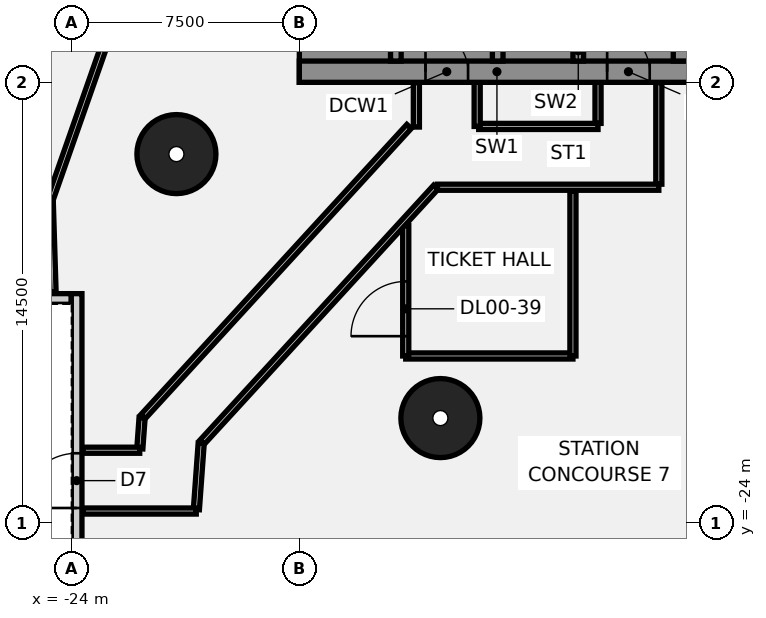
"""IFC4 building model, lengths in metres.
Left out: names, types, materials, properties, quantities, classifications, styles, units other than length and angle.
Written with IfcOpenShell. Run it as: python <this file> out.ifc"""

import sys

from ifc_helpers import new_model, si_unit, direction, frame, frame_2d, origin, origin_2d, place, context, subcontext, project, spatial, polyline, rectangle, circle, outline, extrude, element, fill, save


model = new_model("IFC4")
c1 = context("Model", 3, precision=1e-05, world=origin(), true_north=direction((0.0, 1.0)))
c2 = subcontext(c1, "Body", "Model", "MODEL_VIEW")
j1 = project(units=[si_unit("LENGTHUNIT", "METRE"), si_unit("PLANEANGLEUNIT", "RADIAN")], contexts=[c1])
p1 = place(None, origin())
s1 = spatial("IfcSite", under=j1, at=p1, CompositionType="ELEMENT")
p2 = place(p1, origin())
s2 = spatial("IfcBuilding", under=s1, at=p2, CompositionType="ELEMENT")
p3 = place(p2, origin())
s3 = spatial("IfcBuildingStorey", under=s2, at=p3, CompositionType="ELEMENT", Elevation=0.0)
for number, where, z_axis, x_axis in (
    (1, (-20.543, -11.86, -0.55), (0.0, 0.0, 1.0), (1.0, 0.0, 0.0)),
    (2, (-11.86, -20.543, -0.55), (0.0, 0.0, 1.0), (1.0, 0.0, 0.0)),
):
    element("IfcColumn", number, at=place(p3, frame(where, z_axis=z_axis, x_axis=x_axis)), inside=s3, PredefinedType="COLUMN", context=c2, shape_type="SweptSolid", body=[
        extrude(circle(Radius=1.3, at=origin_2d()), origin(), (0.0, 0.0, 1.0), 9.05),
    ])
p4 = place(p3, frame((-13.0, -18.5, 0.0), z_axis=(0.0, 0.0, 1.0), x_axis=(1.0, 0.0, 0.0)))
e3 = element("IfcWall", 3, at=p4, inside=s3, PredefinedType="PARTITIONING", context=c2, shape_type="SweptSolid", body=[
    extrude(rectangle(XDim=5.5, YDim=0.2, at=frame_2d((2.75, 0.0))), origin(), (0.0, 0.0, 1.0), 8.5),
])
p5 = place(p3, frame((-13.0, -18.5, 0.0), z_axis=(0.0, 0.0, 1.0), x_axis=(0.0, 1.0, 0.0)))
e4 = element("IfcWall", 4, at=p5, inside=s3, PredefinedType="PARTITIONING", context=c2, shape_type="SweptSolid", body=[
    extrude(rectangle(XDim=4.292, YDim=0.2, at=frame_2d((2.146, 0.0))), origin(), (0.0, 0.0, 1.0), 8.5),
])
p6 = place(p5, frame((0.651, 0.0, 0.0)))
e5 = element("IfcOpeningElement", 5, at=p6, cuts=e4, PredefinedType="OPENING", context=c2, shape_type="SweptSolid", body=[
    extrude(rectangle(XDim=1.8, YDim=2.1, at=frame_2d((0.9, 1.05))), frame((0.0, 0.11, 0.0), z_axis=(0.0, -1.0, 0.0), x_axis=(1.0, 0.0, 0.0)), (0.0, 0.0, 1.0), 0.22),
])
p7 = place(p3, frame((-7.5, -18.5, 0.0), z_axis=(0.0, 0.0, 1.0), x_axis=(0.0, 1.0, 0.0)))
e6 = element("IfcWall", 6, at=p7, inside=s3, PredefinedType="PARTITIONING", context=c2, shape_type="SweptSolid", body=[
    extrude(rectangle(XDim=5.43, YDim=0.2, at=frame_2d((2.715, 0.0))), origin(), (0.0, 0.0, 1.0), 8.5),
])
p8 = place(p3, frame((-4.675, -9.5, 0.0), z_axis=(0.0, 0.0, 1.0), x_axis=(0.0, -1.0, 0.0)))
e7 = element("IfcWall", 7, at=p8, inside=s3, PredefinedType="PARTITIONING", context=c2, shape_type="SweptSolid", body=[
    extrude(rectangle(XDim=3.35, YDim=0.2, at=frame_2d((1.675, 0.0))), origin(), (0.0, 0.0, 1.0), 8.5),
])
p9 = place(p3, frame((-4.675, -12.95, 0.0), z_axis=(0.0, 0.0, 1.0), x_axis=(-1.0, 0.0, 0.0)))
e8 = element("IfcWall", 8, at=p9, inside=s3, PredefinedType="PARTITIONING", context=c2, shape_type="SweptSolid", body=[
    extrude(rectangle(XDim=7.285, YDim=0.2, at=frame_2d((3.643, 0.0))), origin(), (0.0, 0.0, 1.0), 8.5),
])
p10 = place(p3, frame((-12.01, -12.95, 0.0), z_axis=(0.0, 0.0, 1.0), x_axis=(-0.675727545108, -0.737151466648, 0.0)))
e9 = element("IfcWall", 9, at=p10, inside=s3, PredefinedType="PARTITIONING", context=c2, shape_type="SweptSolid", body=[
    extrude(rectangle(XDim=11.372, YDim=0.2, at=frame_2d((5.686, 0.0))), origin(), (0.0, 0.0, 1.0), 8.5),
])
p11 = place(p3, frame((-19.728, -21.369, 0.0), z_axis=(0.0, 0.0, 1.0), x_axis=(-0.072580125399, -0.997362584719, 0.0)))
e10 = element("IfcWall", 10, at=p11, inside=s3, PredefinedType="PARTITIONING", context=c2, shape_type="SweptSolid", body=[
    extrude(rectangle(XDim=2.187, YDim=0.2, at=frame_2d((1.093, 0.0))), origin(), (0.0, 0.0, 1.0), 8.5),
])
p12 = place(p3, frame((-19.89, -23.6, 0.0), z_axis=(0.0, 0.0, 1.0), x_axis=(-1.0, 0.0, 0.0)))
e11 = element("IfcWall", 11, at=p12, inside=s3, PredefinedType="PARTITIONING", context=c2, shape_type="SweptSolid", body=[
    extrude(rectangle(XDim=3.73, YDim=0.2, at=frame_2d((1.865, 0.0))), origin(), (0.0, 0.0, 1.0), 8.5),
])
p13 = place(p3, frame((-6.675, -9.5, 0.0), z_axis=(0.0, 0.0, 1.0), x_axis=(0.0, -1.0, 0.0)))
e12 = element("IfcWall", 12, at=p13, inside=s3, PredefinedType="PARTITIONING", context=c2, shape_type="SweptSolid", body=[
    extrude(rectangle(XDim=1.35, YDim=0.2, at=frame_2d((0.675, 0.0))), origin(), (0.0, 0.0, 1.0), 8.5),
])
p14 = place(p3, frame((-6.675, -10.95, 0.0), z_axis=(0.0, 0.0, 1.0), x_axis=(-1.0, 0.0, 0.0)))
e13 = element("IfcWall", 13, at=p14, inside=s3, PredefinedType="PARTITIONING", context=c2, shape_type="SweptSolid", body=[
    extrude(rectangle(XDim=3.925, YDim=0.2, at=frame_2d((1.962, 0.0))), origin(), (0.0, 0.0, 1.0), 8.5),
])
p15 = place(p3, frame((-12.89, -10.95, 0.0), z_axis=(0.0, 0.0, 1.0), x_axis=(-0.675720358886, -0.737158054007, 0.0)))
e14 = element("IfcWall", 14, at=p15, inside=s3, PredefinedType="PARTITIONING", context=c2, shape_type="SweptSolid", body=[
    extrude(rectangle(XDim=12.947, YDim=0.2, at=frame_2d((6.473, 0.0))), origin(), (0.0, 0.0, 1.0), 8.5),
])
p16 = place(p3, frame((-21.672, -20.531, 0.0), z_axis=(0.0, 0.0, 1.0), x_axis=(-0.072604808335, -0.997360788184, 0.0)))
e15 = element("IfcWall", 15, at=p16, inside=s3, PredefinedType="PARTITIONING", context=c2, shape_type="SweptSolid", body=[
    extrude(rectangle(XDim=1.022, YDim=0.2, at=frame_2d((0.511, 0.0))), origin(), (0.0, 0.0, 1.0), 8.5),
])
p17 = place(p3, frame((-21.75, -21.6, 0.0), z_axis=(0.0, 0.0, 1.0), x_axis=(-1.0, 0.0, 0.0)))
e16 = element("IfcWall", 16, at=p17, inside=s3, PredefinedType="PARTITIONING", context=c2, shape_type="SweptSolid", body=[
    extrude(rectangle(XDim=1.87, YDim=0.2, at=frame_2d((0.935, 0.0))), origin(), (0.0, 0.0, 1.0), 8.5),
])
p18 = place(p3, frame((-18.1, 5.453, 0.0), z_axis=(0.0, 0.0, 1.0), x_axis=(-0.33089272618, -0.943668375946, 0.0)))
e17 = element("IfcWall", 17, at=p18, inside=s3, PredefinedType="PARTITIONING", context=c2, shape_type="SweptSolid", body=[
    extrude(rectangle(XDim=19.931, YDim=0.2, at=frame_2d((9.965, 0.0))), origin(), (0.0, 0.0, 1.0), 8.5),
])
p19 = place(p3, frame((-24.695, -13.355, 0.0), z_axis=(0.0, 0.0, 1.0), x_axis=(0.030966071292, -0.999520436224, 0.0)))
e18 = element("IfcWall", 18, at=p19, inside=s3, PredefinedType="PARTITIONING", context=c2, shape_type="SweptSolid", body=[
    extrude(rectangle(XDim=3.035, YDim=0.2, at=frame_2d((1.518, 0.0))), origin(), (0.0, 0.0, 1.0), 8.5),
])
p20 = place(p3, frame((-19.8, 6.647, 0.0), z_axis=(0.0, 0.0, 1.0), x_axis=(-0.330903303789, -0.943664666893, 0.0)))
e19 = element("IfcWall", 19, at=p20, inside=s3, PredefinedType="PARTITIONING", context=c2, shape_type="SweptSolid", body=[
    extrude(rectangle(XDim=20.867, YDim=0.2, at=frame_2d((10.434, 0.0))), origin(), (0.0, 0.0, 1.0), 8.5),
])
p21 = place(p3, frame((-10.65, -9.5, 0.0), z_axis=(0.0, 0.0, 1.0), x_axis=(0.0, -1.0, 0.0)))
e20 = element("IfcWall", 20, at=p21, inside=s3, PredefinedType="PARTITIONING", context=c2, shape_type="SweptSolid", body=[
    extrude(rectangle(XDim=1.45, YDim=0.2, at=frame_2d((0.725, 0.0))), origin(), (0.0, 0.0, 1.0), 8.5),
])
p22 = place(p3, frame((-12.65, -9.5, 0.0), z_axis=(0.0, 0.0, 1.0), x_axis=(0.0, -1.0, 0.0)))
e21 = element("IfcWall", 21, at=p22, inside=s3, PredefinedType="PARTITIONING", context=c2, shape_type="SweptSolid", body=[
    extrude(rectangle(XDim=1.47, YDim=0.2, at=frame_2d((0.735, 0.0))), origin(), (0.0, 0.0, 1.0), 8.5),
])
p23 = place(p3, frame((-42.0, -16.625, 0.0), z_axis=(0.0, 0.0, 1.0), x_axis=(1.0, 0.0, 0.0)))
e22 = element("IfcWall", 22, at=p23, inside=s3, PredefinedType="SOLIDWALL", context=c2, shape_type="SweptSolid", body=[
    extrude(rectangle(XDim=18.0, YDim=0.35, at=frame_2d((9.0, 0.0))), origin(), (0.0, 0.0, 1.0), 8.5),
])
p24 = place(p23, frame((13.0, 0.0, 0.0)))
e23 = element("IfcOpeningElement", 23, at=p24, cuts=e22, PredefinedType="OPENING", context=c2, shape_type="SweptSolid", body=[
    extrude(rectangle(XDim=1.8, YDim=2.4, at=frame_2d((0.9, 1.2))), frame((0.0, 0.185, 0.0), z_axis=(0.0, -1.0, 0.0), x_axis=(1.0, 0.0, 0.0)), (0.0, 0.0, 1.0), 0.37),
])
p25 = place(p23, frame((15.5, 0.0, 0.0)))
e24 = element("IfcOpeningElement", 24, at=p25, cuts=e22, PredefinedType="OPENING", context=c2, shape_type="SweptSolid", body=[
    extrude(rectangle(XDim=1.8, YDim=2.4, at=frame_2d((0.9, 1.2))), frame((0.0, 0.185, 0.0), z_axis=(0.0, -1.0, 0.0), x_axis=(1.0, 0.0, 0.0)), (0.0, 0.0, 1.0), 0.37),
])
p26 = place(p23, frame((4.05, 0.0, 1.0)))
e25 = element("IfcOpeningElement", 25, at=p26, cuts=e22, PredefinedType="OPENING", context=c2, shape_type="SweptSolid", body=[
    extrude(rectangle(XDim=2.4, YDim=1.8, at=frame_2d((1.2, 0.9))), frame((0.0, 0.185, 0.0), z_axis=(0.0, -1.0, 0.0), x_axis=(1.0, 0.0, 0.0)), (0.0, 0.0, 1.0), 0.37),
])
p27 = place(p3, frame((-23.825, -43.85, 0.0), z_axis=(0.0, 0.0, 1.0), x_axis=(0.0, 1.0, 0.0)))
e26 = element("IfcWall", 26, at=p27, inside=s3, PredefinedType="SOLIDWALL", context=c2, shape_type="SweptSolid", body=[
    extrude(rectangle(XDim=27.4, YDim=0.35, at=frame_2d((13.7, 0.0))), origin(), (0.0, 0.0, 1.0), 8.5),
])
p28 = place(p27, frame((20.35, 0.0, 0.0)))
e27 = element("IfcOpeningElement", 27, at=p28, cuts=e26, PredefinedType="OPENING", context=c2, shape_type="SweptSolid", body=[
    extrude(rectangle(XDim=1.8, YDim=2.4, at=frame_2d((0.9, 1.2))), frame((0.0, 0.185, 0.0), z_axis=(0.0, -1.0, 0.0), x_axis=(1.0, 0.0, 0.0)), (0.0, 0.0, 1.0), 0.37),
])
p29 = place(p27, frame((4.85, 0.0, 0.0)))
e28 = element("IfcOpeningElement", 28, at=p29, cuts=e26, PredefinedType="OPENING", context=c2, shape_type="SweptSolid", body=[
    extrude(rectangle(XDim=1.8, YDim=2.4, at=frame_2d((0.9, 1.2))), frame((0.0, 0.185, 0.0), z_axis=(0.0, -1.0, 0.0), x_axis=(1.0, 0.0, 0.0)), (0.0, 0.0, 1.0), 0.37),
])
p30 = place(p27, frame((14.9, 0.0, 1.0)))
e29 = element("IfcOpeningElement", 29, at=p30, cuts=e26, PredefinedType="OPENING", context=c2, shape_type="SweptSolid", body=[
    extrude(rectangle(XDim=2.4, YDim=1.8, at=frame_2d((1.2, 0.9))), frame((0.0, 0.185, 0.0), z_axis=(0.0, -1.0, 0.0), x_axis=(1.0, 0.0, 0.0)), (0.0, 0.0, 1.0), 0.37),
])
p31 = place(p3, frame((-16.5, -9.15, 0.0), z_axis=(0.0, 0.0, 1.0), x_axis=(1.0, 0.0, 0.0)))
e30 = element("IfcWall", 30, at=p31, inside=s3, PredefinedType="SHEAR", context=c2, shape_type="SweptSolid", body=[
    extrude(rectangle(XDim=13.0, YDim=0.7, at=frame_2d((6.5, 0.0))), origin(), (0.0, 0.0, 1.0), 8.5),
])
p32 = place(p31, frame((4.15, 0.0, 0.0)))
e31 = element("IfcOpeningElement", 31, at=p32, cuts=e30, PredefinedType="OPENING", context=c2, shape_type="SweptSolid", body=[
    extrude(rectangle(XDim=1.4, YDim=2.1, at=frame_2d((0.7, 1.05))), frame((0.0, 0.36, 0.0), z_axis=(0.0, -1.0, 0.0), x_axis=(1.0, 0.0, 0.0)), (0.0, 0.0, 1.0), 0.72),
])
p33 = place(p31, frame((10.125, 0.0, 0.0)))
e32 = element("IfcOpeningElement", 32, at=p33, cuts=e30, PredefinedType="OPENING", context=c2, shape_type="SweptSolid", body=[
    extrude(rectangle(XDim=1.4, YDim=2.1, at=frame_2d((0.7, 1.05))), frame((0.0, 0.36, 0.0), z_axis=(0.0, -1.0, 0.0), x_axis=(1.0, 0.0, 0.0)), (0.0, 0.0, 1.0), 0.72),
])
p34 = place(p3, origin())
e33 = element("IfcWall", 33, at=p34, inside=s3, PredefinedType="SHEAR", context=c2, shape_type="SweptSolid", body=[
    extrude(outline(polyline([(-13.5, -8.8), (-13.5, -8.125), (-15.8, -8.125), (-15.8, -5.625), (-13.5, -5.625), (-13.5, -5.375), (-15.8, -5.375), (-15.8, -2.875), (-13.5, -2.875), (-13.5, -2.625), (-15.8, -2.625), (-15.8, -0.125), (-13.5, -0.125), (-13.5, 0.125), (-15.8, 0.125), (-15.8, 2.625), (-13.5, 2.625), (-13.5, 2.875), (-15.8, 2.875), (-15.8, 5.375), (-13.5, 5.375), (-13.5, 5.625), (-15.8, 5.625), (-15.8, 8.125), (-13.5, 8.125), (-13.5, 8.8), (-15.8, 8.8), (-16.5, 8.8), (-16.5, -8.8), (-15.8, -8.8), (-13.5, -8.8)])), origin(), (0.0, 0.0, 1.0), 8.5),
])
p35 = place(p3, origin())
e34 = element("IfcWall", 34, at=p35, inside=s3, PredefinedType="SHEAR", context=c2, shape_type="SweptSolid", body=[
    extrude(outline(polyline([(-7.5, -8.125), (-9.55, -8.125), (-9.55, -5.625), (-9.8, -5.625), (-9.8, -8.125), (-9.8, -8.8), (-7.5, -8.8), (-7.5, -8.125)])), origin(), (0.0, 0.0, 1.0), 8.5),
])
p36 = place(p3, frame((-7.325, -8.8, 0.0), z_axis=(0.0, 0.0, 1.0), x_axis=(0.0, 1.0, 0.0)))
e35 = element("IfcWall", 35, at=p36, inside=s3, PredefinedType="SHEAR", context=c2, shape_type="SweptSolid", body=[
    extrude(rectangle(XDim=0.675, YDim=0.35, at=frame_2d((0.337, 0.0))), origin(), (0.0, 0.0, 1.0), 8.5),
])
p37 = place(p3, frame((-13.325, -8.8, 0.0), z_axis=(0.0, 0.0, 1.0), x_axis=(0.0, 1.0, 0.0)))
e36 = element("IfcWall", 36, at=p37, inside=s3, PredefinedType="SHEAR", context=c2, shape_type="SweptSolid", body=[
    extrude(rectangle(XDim=17.6, YDim=0.35, at=frame_2d((8.8, 0.0))), origin(), (0.0, 0.0, 1.0), 8.5),
])
p38 = place(p37, frame((1.225, 0.0, 0.0)))
e37 = element("IfcOpeningElement", 37, at=p38, cuts=e36, PredefinedType="OPENING", context=c2, shape_type="SweptSolid", body=[
    extrude(rectangle(XDim=1.4, YDim=2.1, at=frame_2d((0.7, 1.05))), frame((0.0, 0.185, 0.0), z_axis=(0.0, -1.0, 0.0), x_axis=(1.0, 0.0, 0.0)), (0.0, 0.0, 1.0), 0.37),
])
p39 = place(p37, frame((4.125, 0.0, 0.0)))
e38 = element("IfcOpeningElement", 38, at=p39, cuts=e36, PredefinedType="OPENING", context=c2, shape_type="SweptSolid", body=[
    extrude(rectangle(XDim=1.1, YDim=2.1, at=frame_2d((0.55, 1.05))), frame((0.0, 0.185, 0.0), z_axis=(0.0, -1.0, 0.0), x_axis=(1.0, 0.0, 0.0)), (0.0, 0.0, 1.0), 0.37),
])
p40 = place(p37, frame((6.875, 0.0, 0.0)))
e39 = element("IfcOpeningElement", 39, at=p40, cuts=e36, PredefinedType="OPENING", context=c2, shape_type="SweptSolid", body=[
    extrude(rectangle(XDim=1.1, YDim=2.1, at=frame_2d((0.55, 1.05))), frame((0.0, 0.185, 0.0), z_axis=(0.0, -1.0, 0.0), x_axis=(1.0, 0.0, 0.0)), (0.0, 0.0, 1.0), 0.37),
])
p41 = place(p37, frame((9.625, 0.0, 0.0)))
e40 = element("IfcOpeningElement", 40, at=p41, cuts=e36, PredefinedType="OPENING", context=c2, shape_type="SweptSolid", body=[
    extrude(rectangle(XDim=1.1, YDim=2.1, at=frame_2d((0.55, 1.05))), frame((0.0, 0.185, 0.0), z_axis=(0.0, -1.0, 0.0), x_axis=(1.0, 0.0, 0.0)), (0.0, 0.0, 1.0), 0.37),
])
p42 = place(p37, frame((12.375, 0.0, 0.0)))
e41 = element("IfcOpeningElement", 41, at=p42, cuts=e36, PredefinedType="OPENING", context=c2, shape_type="SweptSolid", body=[
    extrude(rectangle(XDim=1.1, YDim=2.1, at=frame_2d((0.55, 1.05))), frame((0.0, 0.185, 0.0), z_axis=(0.0, -1.0, 0.0), x_axis=(1.0, 0.0, 0.0)), (0.0, 0.0, 1.0), 0.37),
])
p43 = place(p37, frame((15.075, 0.0, 0.0)))
e42 = element("IfcOpeningElement", 42, at=p43, cuts=e36, PredefinedType="OPENING", context=c2, shape_type="SweptSolid", body=[
    extrude(rectangle(XDim=1.2, YDim=2.1, at=frame_2d((0.6, 1.05))), frame((0.0, 0.185, 0.0), z_axis=(0.0, -1.0, 0.0), x_axis=(1.0, 0.0, 0.0)), (0.0, 0.0, 1.0), 0.37),
])
p44 = place(p3, frame((-9.975, -8.8, 0.0), z_axis=(0.0, 0.0, 1.0), x_axis=(0.0, 1.0, 0.0)))
e43 = element("IfcWall", 43, at=p44, inside=s3, PredefinedType="SHEAR", context=c2, shape_type="SweptSolid", body=[
    extrude(rectangle(XDim=17.6, YDim=0.35, at=frame_2d((8.8, 0.0))), origin(), (0.0, 0.0, 1.0), 8.5),
])
p45 = place(p44, frame((4.075, 0.0, 0.0)))
e44 = element("IfcOpeningElement", 44, at=p45, cuts=e43, PredefinedType="OPENING", context=c2, shape_type="SweptSolid", body=[
    extrude(rectangle(XDim=1.2, YDim=2.1, at=frame_2d((0.6, 1.05))), frame((0.0, 0.185, 0.0), z_axis=(0.0, -1.0, 0.0), x_axis=(1.0, 0.0, 0.0)), (0.0, 0.0, 1.0), 0.37),
])
p46 = place(p44, frame((6.825, 0.0, 0.0)))
e45 = element("IfcOpeningElement", 45, at=p46, cuts=e43, PredefinedType="OPENING", context=c2, shape_type="SweptSolid", body=[
    extrude(rectangle(XDim=1.2, YDim=2.1, at=frame_2d((0.6, 1.05))), frame((0.0, 0.185, 0.0), z_axis=(0.0, -1.0, 0.0), x_axis=(1.0, 0.0, 0.0)), (0.0, 0.0, 1.0), 0.37),
])
p47 = place(p44, frame((9.625, 0.0, 0.0)))
e46 = element("IfcOpeningElement", 46, at=p47, cuts=e43, PredefinedType="OPENING", context=c2, shape_type="SweptSolid", body=[
    extrude(rectangle(XDim=1.1, YDim=2.1, at=frame_2d((0.55, 1.05))), frame((0.0, 0.185, 0.0), z_axis=(0.0, -1.0, 0.0), x_axis=(1.0, 0.0, 0.0)), (0.0, 0.0, 1.0), 0.37),
])
p48 = place(p3, frame((-3.85, -8.8, 0.0), z_axis=(0.0, 0.0, 1.0), x_axis=(0.0, 1.0, 0.0)))
e47 = element("IfcWall", 47, at=p48, inside=s3, PredefinedType="SHEAR", context=c2, shape_type="SweptSolid", body=[
    extrude(rectangle(XDim=17.6, YDim=0.7, at=frame_2d((8.8, 0.0))), origin(), (0.0, 0.0, 1.0), 8.5),
])
p49 = place(p48, frame((1.15, 0.0, 0.0)))
e48 = element("IfcOpeningElement", 48, at=p49, cuts=e47, PredefinedType="OPENING", context=c2, shape_type="SweptSolid", body=[
    extrude(rectangle(XDim=1.8, YDim=2.1, at=frame_2d((0.9, 1.05))), frame((0.0, 0.36, 0.0), z_axis=(0.0, -1.0, 0.0), x_axis=(1.0, 0.0, 0.0)), (0.0, 0.0, 1.0), 0.72),
])
p50 = place(p48, frame((13.7, 0.0, 0.0)))
e49 = element("IfcOpeningElement", 49, at=p50, cuts=e47, PredefinedType="OPENING", context=c2, shape_type="SweptSolid", body=[
    extrude(rectangle(XDim=1.0, YDim=2.1, at=frame_2d((0.5, 1.05))), frame((0.0, 0.36, 0.0), z_axis=(0.0, -1.0, 0.0), x_axis=(1.0, 0.0, 0.0)), (0.0, 0.0, 1.0), 0.72),
])
p51 = place(p6, origin())
e50 = element("IfcDoor", 50, at=p51, inside=s3, OperationType="SINGLE_SWING_LEFT", PredefinedType="DOOR", context=c2, shape_type="SweptSolid", body=[
    extrude(rectangle(XDim=1.8, YDim=2.1, at=frame_2d((0.9, 1.05))), frame((0.0, 0.025, 0.0), z_axis=(0.0, -1.0, 0.0), x_axis=(1.0, 0.0, 0.0)), (0.0, 0.0, 1.0), 0.05),
])
fill(e5, e50)
p52 = place(p28, origin())
e51 = element("IfcDoor", 51, at=p52, inside=s3, OperationType="SINGLE_SWING_LEFT", PredefinedType="DOOR", context=c2, shape_type="SweptSolid", body=[
    extrude(rectangle(XDim=1.8, YDim=2.4, at=frame_2d((0.9, 1.2))), frame((0.0, 0.025, 0.0), z_axis=(0.0, -1.0, 0.0), x_axis=(1.0, 0.0, 0.0)), (0.0, 0.0, 1.0), 0.05),
])
fill(e27, e51)
p53 = place(p32, origin())
e52 = element("IfcDoor", 52, at=p53, inside=s3, OperationType="SINGLE_SWING_LEFT", PredefinedType="DOOR", context=c2, shape_type="SweptSolid", body=[
    extrude(rectangle(XDim=1.4, YDim=2.1, at=frame_2d((0.7, 1.05))), frame((0.0, 0.025, 0.0), z_axis=(0.0, -1.0, 0.0), x_axis=(1.0, 0.0, 0.0)), (0.0, 0.0, 1.0), 0.05),
])
fill(e31, e52)
p54 = place(p33, origin())
e53 = element("IfcDoor", 53, at=p54, inside=s3, OperationType="SINGLE_SWING_LEFT", PredefinedType="DOOR", context=c2, shape_type="SweptSolid", body=[
    extrude(rectangle(XDim=1.4, YDim=2.1, at=frame_2d((0.7, 1.05))), frame((0.0, 0.025, 0.0), z_axis=(0.0, -1.0, 0.0), x_axis=(1.0, 0.0, 0.0)), (0.0, 0.0, 1.0), 0.05),
])
fill(e32, e53)
save(model, sys.argv[1])
